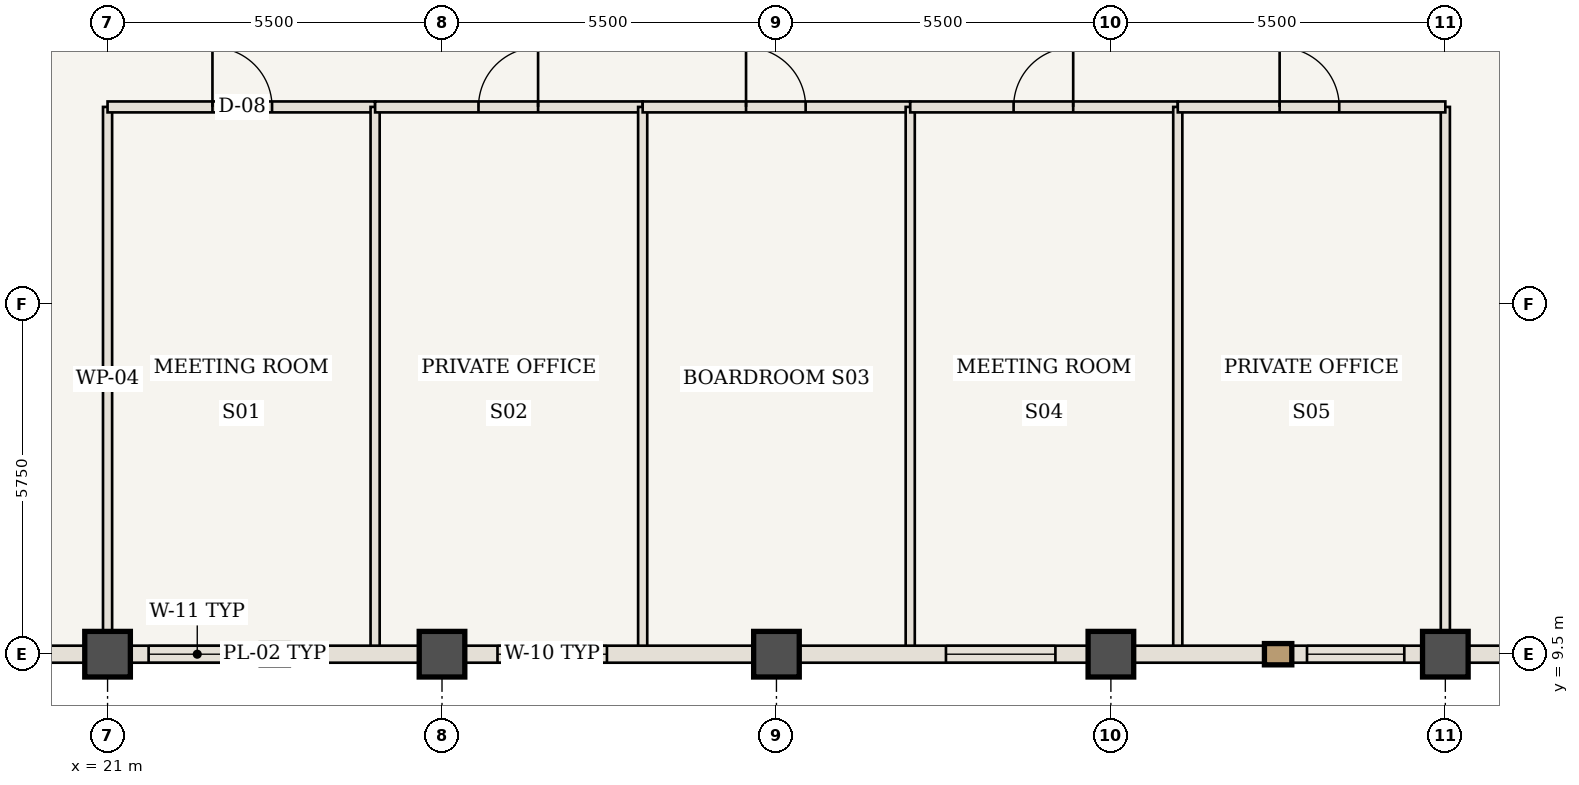
"""IFC4 building model, lengths in metres.
Left out: names, types, materials, properties, quantities, classifications, styles, units other than length and angle.
Written with IfcOpenShell. Run it as: python <this file> out.ifc"""

import sys

from ifc_helpers import new_model, si_unit, direction, frame, frame_2d, origin, origin_2d, place, context, subcontext, project, spatial, rectangle, extrude, element, fill, save


model = new_model("IFC4")
c1 = context("Model", 3, precision=1e-05, world=origin(), true_north=direction((0.0, 1.0)))
c2 = subcontext(c1, "Body", "Model", "MODEL_VIEW")
j1 = project(units=[si_unit("LENGTHUNIT", "METRE"), si_unit("PLANEANGLEUNIT", "RADIAN")], contexts=[c1])
p1 = place(None, origin())
s1 = spatial("IfcSite", under=j1, at=p1, CompositionType="ELEMENT")
p2 = place(p1, origin())
s2 = spatial("IfcBuilding", under=s1, at=p2, CompositionType="ELEMENT")
p3 = place(p2, frame((0.0, 0.0, 292.95)))
s3 = spatial("IfcBuildingStorey", under=s2, at=p3, CompositionType="ELEMENT", Elevation=292.95)
for number, where, z_axis, x_axis in (
    (1, (21.0, 9.5, 0.0), (0.0, 0.0, 1.0), (1.0, 0.0, 0.0)),
    (2, (26.5, 9.5, 0.0), (0.0, 0.0, 1.0), (1.0, 0.0, 0.0)),
    (3, (32.0, 9.5, 0.0), (0.0, 0.0, 1.0), (1.0, 0.0, 0.0)),
    (4, (37.5, 9.5, 0.0), (0.0, 0.0, 1.0), (1.0, 0.0, 0.0)),
    (5, (43.0, 9.5, 0.0), (0.0, 0.0, 1.0), (1.0, 0.0, 0.0)),
):
    element("IfcColumn", number, at=place(p3, frame(where, z_axis=z_axis, x_axis=x_axis)), inside=s3, PredefinedType="COLUMN", context=c2, shape_type="SweptSolid", body=[
        extrude(rectangle(XDim=0.75, YDim=0.75, at=origin_2d()), origin(), (0.0, 0.0, 1.0), 3.85),
    ])
for number, where, z_axis, x_axis in (
    (6, (21.0, 9.56, 0.0), (0.0, 0.0, 1.0), (0.0, 1.0, 0.0)),
    (7, (43.0, 9.56, 0.0), (0.0, 0.0, 1.0), (0.0, 1.0, 0.0)),
):
    element("IfcWall", number, at=place(p3, frame(where, z_axis=z_axis, x_axis=x_axis)), inside=s3, PredefinedType="STANDARD", context=c2, shape_type="SweptSolid", body=[
        extrude(rectangle(XDim=8.94, YDim=0.15, at=frame_2d((4.47, 0.0))), origin(), (0.0, 0.0, 1.0), 3.685),
    ])
p4 = place(p3, frame((21.0, 18.5, 0.0), z_axis=(0.0, 0.0, 1.0), x_axis=(1.0, 0.0, 0.0)))
e8 = element("IfcWall", 8, at=p4, inside=s3, PredefinedType="STANDARD", context=c2, shape_type="SweptSolid", body=[
    extrude(rectangle(XDim=4.4, YDim=0.18, at=frame_2d((2.2, 0.0))), origin(), (0.0, 0.0, 1.0), 3.685),
])
p5 = place(p4, frame((1.725, 0.0, 0.0)))
e9 = element("IfcOpeningElement", 9, at=p5, cuts=e8, PredefinedType="OPENING", context=c2, shape_type="SweptSolid", body=[
    extrude(rectangle(XDim=0.98, YDim=2.2, at=frame_2d((0.49, 1.1))), frame((0.0, 0.1, 0.0), z_axis=(0.0, -1.0, 0.0), x_axis=(1.0, 0.0, 0.0)), (0.0, 0.0, 1.0), 0.2),
])
p6 = place(p3, frame((25.4, 9.56, 0.0), z_axis=(0.0, 0.0, 1.0), x_axis=(0.0, 1.0, 0.0)))
e10 = element("IfcWall", 10, at=p6, inside=s3, PredefinedType="STANDARD", context=c2, shape_type="SweptSolid", body=[
    extrude(rectangle(XDim=8.94, YDim=0.15, at=frame_2d((4.47, 0.0))), origin(), (0.0, 0.0, 1.0), 3.685),
])
p7 = place(p3, frame((25.4, 18.5, 0.0), z_axis=(0.0, 0.0, 1.0), x_axis=(1.0, 0.0, 0.0)))
e11 = element("IfcWall", 11, at=p7, inside=s3, PredefinedType="STANDARD", context=c2, shape_type="SweptSolid", body=[
    extrude(rectangle(XDim=4.4, YDim=0.18, at=frame_2d((2.2, 0.0))), origin(), (0.0, 0.0, 1.0), 3.685),
])
p8 = place(p7, frame((1.7, 0.0, 0.0)))
e12 = element("IfcOpeningElement", 12, at=p8, cuts=e11, PredefinedType="OPENING", context=c2, shape_type="SweptSolid", body=[
    extrude(rectangle(XDim=0.98, YDim=2.2, at=frame_2d((0.49, 1.1))), frame((0.0, 0.1, 0.0), z_axis=(0.0, -1.0, 0.0), x_axis=(1.0, 0.0, 0.0)), (0.0, 0.0, 1.0), 0.2),
])
p9 = place(p3, frame((29.8, 9.56, 0.0), z_axis=(0.0, 0.0, 1.0), x_axis=(0.0, 1.0, 0.0)))
e13 = element("IfcWall", 13, at=p9, inside=s3, PredefinedType="STANDARD", context=c2, shape_type="SweptSolid", body=[
    extrude(rectangle(XDim=8.94, YDim=0.15, at=frame_2d((4.47, 0.0))), origin(), (0.0, 0.0, 1.0), 3.685),
])
p10 = place(p3, frame((29.8, 18.5, 0.0), z_axis=(0.0, 0.0, 1.0), x_axis=(1.0, 0.0, 0.0)))
e14 = element("IfcWall", 14, at=p10, inside=s3, PredefinedType="STANDARD", context=c2, shape_type="SweptSolid", body=[
    extrude(rectangle(XDim=4.4, YDim=0.18, at=frame_2d((2.2, 0.0))), origin(), (0.0, 0.0, 1.0), 3.685),
])
p11 = place(p10, frame((1.7, 0.0, 0.0)))
e15 = element("IfcOpeningElement", 15, at=p11, cuts=e14, PredefinedType="OPENING", context=c2, shape_type="SweptSolid", body=[
    extrude(rectangle(XDim=0.98, YDim=2.2, at=frame_2d((0.49, 1.1))), frame((0.0, 0.1, 0.0), z_axis=(0.0, -1.0, 0.0), x_axis=(1.0, 0.0, 0.0)), (0.0, 0.0, 1.0), 0.2),
])
p12 = place(p3, frame((34.2, 9.56, 0.0), z_axis=(0.0, 0.0, 1.0), x_axis=(0.0, 1.0, 0.0)))
e16 = element("IfcWall", 16, at=p12, inside=s3, PredefinedType="STANDARD", context=c2, shape_type="SweptSolid", body=[
    extrude(rectangle(XDim=8.94, YDim=0.15, at=frame_2d((4.47, 0.0))), origin(), (0.0, 0.0, 1.0), 3.685),
])
p13 = place(p3, frame((34.2, 18.5, 0.0), z_axis=(0.0, 0.0, 1.0), x_axis=(1.0, 0.0, 0.0)))
e17 = element("IfcWall", 17, at=p13, inside=s3, PredefinedType="STANDARD", context=c2, shape_type="SweptSolid", body=[
    extrude(rectangle(XDim=4.4, YDim=0.18, at=frame_2d((2.2, 0.0))), origin(), (0.0, 0.0, 1.0), 3.685),
])
p14 = place(p13, frame((1.7, 0.0, 0.0)))
e18 = element("IfcOpeningElement", 18, at=p14, cuts=e17, PredefinedType="OPENING", context=c2, shape_type="SweptSolid", body=[
    extrude(rectangle(XDim=0.98, YDim=2.2, at=frame_2d((0.49, 1.1))), frame((0.0, 0.1, 0.0), z_axis=(0.0, -1.0, 0.0), x_axis=(1.0, 0.0, 0.0)), (0.0, 0.0, 1.0), 0.2),
])
p15 = place(p3, frame((38.6, 9.56, 0.0), z_axis=(0.0, 0.0, 1.0), x_axis=(0.0, 1.0, 0.0)))
e19 = element("IfcWall", 19, at=p15, inside=s3, PredefinedType="STANDARD", context=c2, shape_type="SweptSolid", body=[
    extrude(rectangle(XDim=8.94, YDim=0.15, at=frame_2d((4.47, 0.0))), origin(), (0.0, 0.0, 1.0), 3.685),
])
p16 = place(p3, frame((38.6, 18.5, 0.0), z_axis=(0.0, 0.0, 1.0), x_axis=(1.0, 0.0, 0.0)))
e20 = element("IfcWall", 20, at=p16, inside=s3, PredefinedType="STANDARD", context=c2, shape_type="SweptSolid", body=[
    extrude(rectangle(XDim=4.4, YDim=0.18, at=frame_2d((2.2, 0.0))), origin(), (0.0, 0.0, 1.0), 3.685),
])
p17 = place(p16, frame((1.675, 0.0, 0.0)))
e21 = element("IfcOpeningElement", 21, at=p17, cuts=e20, PredefinedType="OPENING", context=c2, shape_type="SweptSolid", body=[
    extrude(rectangle(XDim=0.98, YDim=2.2, at=frame_2d((0.49, 1.1))), frame((0.0, 0.1, 0.0), z_axis=(0.0, -1.0, 0.0), x_axis=(1.0, 0.0, 0.0)), (0.0, 0.0, 1.0), 0.2),
])
p18 = place(p3, frame((21.0, 9.5, 0.0), z_axis=(0.0, 0.0, 1.0), x_axis=(-1.0, 0.0, 0.0)))
e22 = element("IfcWall", 22, at=p18, inside=s3, PredefinedType="USERDEFINED", context=c2, shape_type="SweptSolid", body=[
    extrude(rectangle(XDim=5.5, YDim=0.28, at=frame_2d((2.75, 0.0))), origin(), (0.0, 0.0, 1.0), 2.985),
])
p19 = place(p3, frame((26.5, 9.5, 0.0), z_axis=(0.0, 0.0, 1.0), x_axis=(-1.0, 0.0, 0.0)))
e23 = element("IfcWall", 23, at=p19, inside=s3, PredefinedType="USERDEFINED", context=c2, shape_type="SweptSolid", body=[
    extrude(rectangle(XDim=5.5, YDim=0.28, at=frame_2d((2.75, 0.0))), origin(), (0.0, 0.0, 1.0), 2.985),
])
p20 = place(p19, frame((3.225, 0.0, 0.85)))
e24 = element("IfcOpeningElement", 24, at=p20, cuts=e23, PredefinedType="OPENING", context=c2, shape_type="SweptSolid", body=[
    extrude(rectangle(XDim=1.6, YDim=1.935, at=frame_2d((0.8, 0.968))), frame((0.0, 0.15, 0.0), z_axis=(0.0, -1.0, 0.0), x_axis=(1.0, 0.0, 0.0)), (0.0, 0.0, 1.0), 0.3),
])
p21 = place(p3, frame((32.0, 9.5, 0.0), z_axis=(0.0, 0.0, 1.0), x_axis=(-1.0, 0.0, 0.0)))
e25 = element("IfcWall", 25, at=p21, inside=s3, PredefinedType="USERDEFINED", context=c2, shape_type="SweptSolid", body=[
    extrude(rectangle(XDim=5.5, YDim=0.28, at=frame_2d((2.75, 0.0))), origin(), (0.0, 0.0, 1.0), 2.985),
])
p22 = place(p21, frame((2.788, 0.0, 0.85)))
e26 = element("IfcOpeningElement", 26, at=p22, cuts=e25, PredefinedType="OPENING", context=c2, shape_type="SweptSolid", body=[
    extrude(rectangle(XDim=1.8, YDim=1.935, at=frame_2d((0.9, 0.968))), frame((0.0, 0.15, 0.0), z_axis=(0.0, -1.0, 0.0), x_axis=(1.0, 0.0, 0.0)), (0.0, 0.0, 1.0), 0.3),
])
p23 = place(p3, frame((37.5, 9.5, 0.0), z_axis=(0.0, 0.0, 1.0), x_axis=(-1.0, 0.0, 0.0)))
e27 = element("IfcWall", 27, at=p23, inside=s3, PredefinedType="USERDEFINED", context=c2, shape_type="SweptSolid", body=[
    extrude(rectangle(XDim=5.5, YDim=0.28, at=frame_2d((2.75, 0.0))), origin(), (0.0, 0.0, 1.0), 2.985),
])
p24 = place(p23, frame((0.913, 0.0, 0.85)))
e28 = element("IfcOpeningElement", 28, at=p24, cuts=e27, PredefinedType="OPENING", context=c2, shape_type="SweptSolid", body=[
    extrude(rectangle(XDim=1.8, YDim=1.935, at=frame_2d((0.9, 0.968))), frame((0.0, 0.15, 0.0), z_axis=(0.0, -1.0, 0.0), x_axis=(1.0, 0.0, 0.0)), (0.0, 0.0, 1.0), 0.3),
])
p25 = place(p3, frame((43.0, 9.5, 0.0), z_axis=(0.0, 0.0, 1.0), x_axis=(-1.0, 0.0, 0.0)))
e29 = element("IfcWall", 29, at=p25, inside=s3, PredefinedType="USERDEFINED", context=c2, shape_type="SweptSolid", body=[
    extrude(rectangle(XDim=5.5, YDim=0.28, at=frame_2d((2.75, 0.0))), origin(), (0.0, 0.0, 1.0), 2.985),
])
p26 = place(p25, frame((0.675, 0.0, 0.85)))
e30 = element("IfcOpeningElement", 30, at=p26, cuts=e29, PredefinedType="OPENING", context=c2, shape_type="SweptSolid", body=[
    extrude(rectangle(XDim=1.6, YDim=1.935, at=frame_2d((0.8, 0.968))), frame((0.0, 0.15, 0.0), z_axis=(0.0, -1.0, 0.0), x_axis=(1.0, 0.0, 0.0)), (0.0, 0.0, 1.0), 0.3),
])
p27 = place(p3, frame((48.5, 9.5, 0.0), z_axis=(0.0, 0.0, 1.0), x_axis=(-1.0, 0.0, 0.0)))
e31 = element("IfcWall", 31, at=p27, inside=s3, PredefinedType="USERDEFINED", context=c2, shape_type="SweptSolid", body=[
    extrude(rectangle(XDim=5.5, YDim=0.28, at=frame_2d((2.75, 0.0))), origin(), (0.0, 0.0, 1.0), 2.985),
])
p28 = place(p5, origin())
e32 = element("IfcDoor", 32, at=p28, inside=s3, OperationType="SINGLE_SWING_LEFT", PredefinedType="DOOR", context=c2, shape_type="SweptSolid", body=[
    extrude(rectangle(XDim=0.98, YDim=2.2, at=frame_2d((0.49, 1.1))), frame((0.0, 0.025, 0.0), z_axis=(0.0, -1.0, 0.0), x_axis=(1.0, 0.0, 0.0)), (0.0, 0.0, 1.0), 0.05),
])
fill(e9, e32)
p29 = place(p8, origin())
e33 = element("IfcDoor", 33, at=p29, inside=s3, OperationType="SINGLE_SWING_RIGHT", PredefinedType="DOOR", context=c2, shape_type="SweptSolid", body=[
    extrude(rectangle(XDim=0.98, YDim=2.2, at=frame_2d((0.49, 1.1))), frame((0.0, 0.025, 0.0), z_axis=(0.0, -1.0, 0.0), x_axis=(1.0, 0.0, 0.0)), (0.0, 0.0, 1.0), 0.05),
])
fill(e12, e33)
p30 = place(p11, origin())
e34 = element("IfcDoor", 34, at=p30, inside=s3, OperationType="SINGLE_SWING_LEFT", PredefinedType="DOOR", context=c2, shape_type="SweptSolid", body=[
    extrude(rectangle(XDim=0.98, YDim=2.2, at=frame_2d((0.49, 1.1))), frame((0.0, 0.025, 0.0), z_axis=(0.0, -1.0, 0.0), x_axis=(1.0, 0.0, 0.0)), (0.0, 0.0, 1.0), 0.05),
])
fill(e15, e34)
p31 = place(p14, origin())
e35 = element("IfcDoor", 35, at=p31, inside=s3, OperationType="SINGLE_SWING_RIGHT", PredefinedType="DOOR", context=c2, shape_type="SweptSolid", body=[
    extrude(rectangle(XDim=0.98, YDim=2.2, at=frame_2d((0.49, 1.1))), frame((0.0, 0.025, 0.0), z_axis=(0.0, -1.0, 0.0), x_axis=(1.0, 0.0, 0.0)), (0.0, 0.0, 1.0), 0.05),
])
fill(e18, e35)
p32 = place(p17, origin())
e36 = element("IfcDoor", 36, at=p32, inside=s3, OperationType="SINGLE_SWING_LEFT", PredefinedType="DOOR", context=c2, shape_type="SweptSolid", body=[
    extrude(rectangle(XDim=0.98, YDim=2.2, at=frame_2d((0.49, 1.1))), frame((0.0, 0.025, 0.0), z_axis=(0.0, -1.0, 0.0), x_axis=(1.0, 0.0, 0.0)), (0.0, 0.0, 1.0), 0.05),
])
fill(e21, e36)
p33 = place(p20, origin())
e37 = element("IfcWindow", 37, at=p33, inside=s3, PartitioningType="SINGLE_PANEL", PredefinedType="WINDOW", context=c2, shape_type="SweptSolid", body=[
    extrude(rectangle(XDim=1.6, YDim=1.935, at=frame_2d((0.8, 0.968))), frame((0.0, 0.03, 0.0), z_axis=(0.0, -1.0, 0.0), x_axis=(1.0, 0.0, 0.0)), (0.0, 0.0, 1.0), 0.06),
])
fill(e24, e37)
p34 = place(p22, origin())
e38 = element("IfcWindow", 38, at=p34, inside=s3, PartitioningType="SINGLE_PANEL", PredefinedType="WINDOW", context=c2, shape_type="SweptSolid", body=[
    extrude(rectangle(XDim=1.8, YDim=1.935, at=frame_2d((0.9, 0.968))), frame((0.0, 0.03, 0.0), z_axis=(0.0, -1.0, 0.0), x_axis=(1.0, 0.0, 0.0)), (0.0, 0.0, 1.0), 0.06),
])
fill(e26, e38)
p35 = place(p24, origin())
e39 = element("IfcWindow", 39, at=p35, inside=s3, PartitioningType="SINGLE_PANEL", PredefinedType="WINDOW", context=c2, shape_type="SweptSolid", body=[
    extrude(rectangle(XDim=1.8, YDim=1.935, at=frame_2d((0.9, 0.968))), frame((0.0, 0.03, 0.0), z_axis=(0.0, -1.0, 0.0), x_axis=(1.0, 0.0, 0.0)), (0.0, 0.0, 1.0), 0.06),
])
fill(e28, e39)
p36 = place(p26, origin())
e40 = element("IfcWindow", 40, at=p36, inside=s3, PartitioningType="SINGLE_PANEL", PredefinedType="WINDOW", context=c2, shape_type="SweptSolid", body=[
    extrude(rectangle(XDim=1.6, YDim=1.935, at=frame_2d((0.8, 0.968))), frame((0.0, 0.03, 0.0), z_axis=(0.0, -1.0, 0.0), x_axis=(1.0, 0.0, 0.0)), (0.0, 0.0, 1.0), 0.06),
])
fill(e30, e40)
save(model, sys.argv[1])
